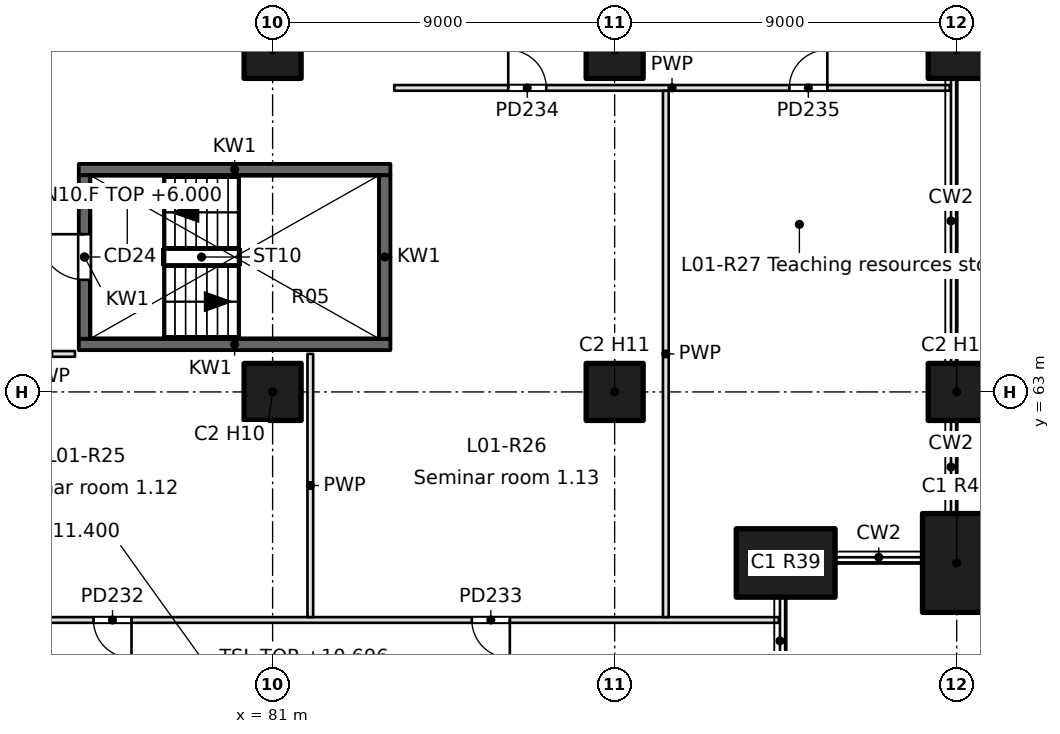
"""IFC4 building model, lengths in metres.
Left out: names, types, materials, properties, quantities, classifications, styles, units other than length and angle.
Written with IfcOpenShell. Run it as: python <this file> out.ifc"""

import sys

from ifc_helpers import new_model, si_unit, direction, frame, frame_2d, origin, origin_2d, place, context, subcontext, project, spatial, rectangle, extrude, element, fill, save


model = new_model("IFC4")
c1 = context("Model", 3, precision=1e-05, world=origin(), true_north=direction((0.0, 1.0)))
c2 = subcontext(c1, "Body", "Model", "MODEL_VIEW")
j1 = project(units=[si_unit("LENGTHUNIT", "METRE"), si_unit("PLANEANGLEUNIT", "RADIAN")], contexts=[c1])
p1 = place(None, origin())
s1 = spatial("IfcSite", under=j1, at=p1, CompositionType="ELEMENT")
p2 = place(p1, origin())
s2 = spatial("IfcBuilding", under=s1, at=p2, CompositionType="ELEMENT")
p3 = place(p2, frame((0.0, 0.0, 6.0)))
s3 = spatial("IfcBuildingStorey", under=s2, at=p3, CompositionType="ELEMENT", Elevation=6.0)
for number, where, z_axis, x_axis in (
    (1, (94.5, 58.5, 0.0), (0.0, 0.0, 1.0), (1.0, 0.0, 0.0)),
    (2, (99.0, 58.5, 0.0), (0.0, 0.0, 1.0), (0.0, 1.0, 0.0)),
):
    element("IfcColumn", number, at=place(p3, frame(where, z_axis=z_axis, x_axis=x_axis)), inside=s3, PredefinedType="COLUMN", context=c2, shape_type="SweptSolid", body=[
        extrude(rectangle(XDim=2.6, YDim=1.8, at=origin_2d()), origin(), (0.0, 0.0, 1.0), 5.4),
    ])
for number, where, z_axis, x_axis in (
    (3, (99.0, 63.0, 0.0), (0.0, 0.0, 1.0), (1.0, 0.0, 0.0)),
    (4, (99.0, 72.0, 0.0), (0.0, 0.0, 1.0), (1.0, 0.0, 0.0)),
    (5, (81.0, 63.0, 0.0), (0.0, 0.0, 1.0), (1.0, 0.0, 0.0)),
    (6, (81.0, 72.0, 0.0), (0.0, 0.0, 1.0), (1.0, 0.0, 0.0)),
    (7, (90.0, 63.0, 0.0), (0.0, 0.0, 1.0), (1.0, 0.0, 0.0)),
    (8, (90.0, 72.0, 0.0), (0.0, 0.0, 1.0), (1.0, 0.0, 0.0)),
):
    element("IfcColumn", number, at=place(p3, frame(where, z_axis=z_axis, x_axis=x_axis)), inside=s3, PredefinedType="COLUMN", context=c2, shape_type="SweptSolid", body=[
        extrude(rectangle(XDim=1.5, YDim=1.5, at=origin_2d()), origin(), (0.0, 0.0, 1.0), 5.4),
    ])
for number, where, z_axis, x_axis in (
    (9, (75.9, 64.25, -0.35), (0.0, 0.0, 1.0), (1.0, 0.0, 0.0)),
    (10, (75.9, 68.85, -0.35), (0.0, 0.0, 1.0), (1.0, 0.0, 0.0)),
):
    element("IfcWall", number, at=place(p3, frame(where, z_axis=z_axis, x_axis=x_axis)), inside=s3, PredefinedType="SOLIDWALL", context=c2, shape_type="SweptSolid", body=[
        extrude(rectangle(XDim=8.2, YDim=0.3, at=frame_2d((4.1, 0.0))), origin(), (0.0, 0.0, 1.0), 5.4),
    ])
p4 = place(p3, frame((76.05, 64.4, -0.35), z_axis=(0.0, 0.0, 1.0), x_axis=(0.0, 1.0, 0.0)))
e11 = element("IfcWall", 11, at=p4, inside=s3, PredefinedType="SOLIDWALL", context=c2, shape_type="SweptSolid", body=[
    extrude(rectangle(XDim=4.3, YDim=0.3, at=frame_2d((2.15, 0.0))), origin(), (0.0, 0.0, 1.0), 5.4),
])
p5 = place(p4, frame((1.55, 0.0, 0.35)))
e12 = element("IfcOpeningElement", 12, at=p5, cuts=e11, PredefinedType="OPENING", context=c2, shape_type="SweptSolid", body=[
    extrude(rectangle(XDim=1.2, YDim=2.1, at=frame_2d((0.6, 1.05))), frame((0.0, 0.15, 0.0), z_axis=(0.0, -1.0, 0.0), x_axis=(1.0, 0.0, 0.0)), (0.0, 0.0, 1.0), 0.3),
])
p6 = place(p3, frame((83.95, 64.4, -0.35), z_axis=(0.0, 0.0, 1.0), x_axis=(0.0, 1.0, 0.0)))
e13 = element("IfcWall", 13, at=p6, inside=s3, PredefinedType="SOLIDWALL", context=c2, shape_type="SweptSolid", body=[
    extrude(rectangle(XDim=4.3, YDim=0.3, at=frame_2d((2.15, 0.0))), origin(), (0.0, 0.0, 1.0), 5.4),
])
p7 = place(p3, frame((74.425, 64.0, 0.0), z_axis=(0.0, 0.0, 1.0), x_axis=(1.0, 0.0, 0.0)))
e14 = element("IfcWall", 14, at=p7, inside=s3, PredefinedType="PARTITIONING", context=c2, shape_type="SweptSolid", body=[
    extrude(rectangle(XDim=1.375, YDim=0.15, at=frame_2d((0.688, 0.0))), origin(), (0.0, 0.0, 1.0), 5.05),
])
p8 = place(p3, frame((94.32, 57.0, 0.0), z_axis=(0.0, 0.0, 1.0), x_axis=(-1.0, 0.0, 0.0)))
e15 = element("IfcWall", 15, at=p8, inside=s3, PredefinedType="PARTITIONING", context=c2, shape_type="SweptSolid", body=[
    extrude(rectangle(XDim=49.395, YDim=0.15, at=frame_2d((24.698, 0.0))), origin(), (0.0, 0.0, 1.0), 5.05),
])
p9 = place(p8, frame((44.57, 0.0, 0.0)))
e16 = element("IfcOpeningElement", 16, at=p9, cuts=e15, PredefinedType="OPENING", context=c2, shape_type="SweptSolid", body=[
    extrude(rectangle(XDim=1.0, YDim=2.1, at=frame_2d((0.5, 1.05))), frame((0.0, 0.075, 0.0), z_axis=(0.0, -1.0, 0.0), x_axis=(1.0, 0.0, 0.0)), (0.0, 0.0, 1.0), 0.15),
])
p10 = place(p8, frame((34.566, 0.0, 0.0)))
e17 = element("IfcOpeningElement", 17, at=p10, cuts=e15, PredefinedType="OPENING", context=c2, shape_type="SweptSolid", body=[
    extrude(rectangle(XDim=1.0, YDim=2.1, at=frame_2d((0.5, 1.05))), frame((0.0, 0.075, 0.0), z_axis=(0.0, -1.0, 0.0), x_axis=(1.0, 0.0, 0.0)), (0.0, 0.0, 1.0), 0.15),
])
p11 = place(p8, frame((25.336, 0.0, 0.0)))
e18 = element("IfcOpeningElement", 18, at=p11, cuts=e15, PredefinedType="OPENING", context=c2, shape_type="SweptSolid", body=[
    extrude(rectangle(XDim=1.0, YDim=2.1, at=frame_2d((0.5, 1.05))), frame((0.0, 0.075, 0.0), z_axis=(0.0, -1.0, 0.0), x_axis=(1.0, 0.0, 0.0)), (0.0, 0.0, 1.0), 0.15),
])
p12 = place(p8, frame((17.033, 0.0, 0.0)))
e19 = element("IfcOpeningElement", 19, at=p12, cuts=e15, PredefinedType="OPENING", context=c2, shape_type="SweptSolid", body=[
    extrude(rectangle(XDim=1.0, YDim=2.1, at=frame_2d((0.5, 1.05))), frame((0.0, 0.075, 0.0), z_axis=(0.0, -1.0, 0.0), x_axis=(1.0, 0.0, 0.0)), (0.0, 0.0, 1.0), 0.15),
])
p13 = place(p8, frame((7.078, 0.0, 0.0)))
e20 = element("IfcOpeningElement", 20, at=p13, cuts=e15, PredefinedType="OPENING", context=c2, shape_type="SweptSolid", body=[
    extrude(rectangle(XDim=1.0, YDim=2.1, at=frame_2d((0.5, 1.05))), frame((0.0, 0.075, 0.0), z_axis=(0.0, -1.0, 0.0), x_axis=(1.0, 0.0, 0.0)), (0.0, 0.0, 1.0), 0.15),
])
p14 = place(p3, frame((84.2, 71.0, 0.0), z_axis=(0.0, 0.0, 1.0), x_axis=(1.0, 0.0, 0.0)))
e21 = element("IfcWall", 21, at=p14, inside=s3, PredefinedType="PARTITIONING", context=c2, shape_type="SweptSolid", body=[
    extrude(rectangle(XDim=14.62, YDim=0.15, at=frame_2d((7.31, 0.0))), origin(), (0.0, 0.0, 1.0), 5.05),
])
p15 = place(p14, frame((3.0, 0.0, 0.0)))
e22 = element("IfcOpeningElement", 22, at=p15, cuts=e21, PredefinedType="OPENING", context=c2, shape_type="SweptSolid", body=[
    extrude(rectangle(XDim=1.0, YDim=2.1, at=frame_2d((0.5, 1.05))), frame((0.0, 0.075, 0.0), z_axis=(0.0, -1.0, 0.0), x_axis=(1.0, 0.0, 0.0)), (0.0, 0.0, 1.0), 0.15),
])
p16 = place(p14, frame((10.396, 0.0, 0.0)))
e23 = element("IfcOpeningElement", 23, at=p16, cuts=e21, PredefinedType="OPENING", context=c2, shape_type="SweptSolid", body=[
    extrude(rectangle(XDim=1.0, YDim=2.1, at=frame_2d((0.5, 1.05))), frame((0.0, 0.075, 0.0), z_axis=(0.0, -1.0, 0.0), x_axis=(1.0, 0.0, 0.0)), (0.0, 0.0, 1.0), 0.15),
])
p17 = place(p3, frame((81.992, 57.075, 0.0), z_axis=(0.0, 0.0, 1.0), x_axis=(0.0, 1.0, 0.0)))
e24 = element("IfcWall", 24, at=p17, inside=s3, PredefinedType="PARTITIONING", context=c2, shape_type="SweptSolid", body=[
    extrude(rectangle(XDim=6.925, YDim=0.15, at=frame_2d((3.462, 0.0))), origin(), (0.0, 0.0, 1.0), 5.05),
])
p18 = place(p3, frame((91.346, 57.075, 0.0), z_axis=(0.0, 0.0, 1.0), x_axis=(0.0, 1.0, 0.0)))
e25 = element("IfcWall", 25, at=p18, inside=s3, PredefinedType="PARTITIONING", context=c2, shape_type="SweptSolid", body=[
    extrude(rectangle(XDim=13.85, YDim=0.15, at=frame_2d((6.925, 0.0))), origin(), (0.0, 0.0, 1.0), 5.05),
])
p19 = place(p5, origin())
e26 = element("IfcDoor", 26, at=p19, inside=s3, OperationType="SINGLE_SWING_RIGHT", PredefinedType="DOOR", context=c2, shape_type="SweptSolid", body=[
    extrude(rectangle(XDim=1.2, YDim=2.1, at=frame_2d((0.6, 1.05))), frame((0.0, 0.025, 0.0), z_axis=(0.0, -1.0, 0.0), x_axis=(1.0, 0.0, 0.0)), (0.0, 0.0, 1.0), 0.05),
])
fill(e12, e26)
p20 = place(p12, origin())
e27 = element("IfcDoor", 27, at=p20, inside=s3, OperationType="SINGLE_SWING_LEFT", PredefinedType="DOOR", context=c2, shape_type="SweptSolid", body=[
    extrude(rectangle(XDim=1.0, YDim=2.1, at=frame_2d((0.5, 1.05))), frame((0.0, 0.025, 0.0), z_axis=(0.0, -1.0, 0.0), x_axis=(1.0, 0.0, 0.0)), (0.0, 0.0, 1.0), 0.05),
])
fill(e19, e27)
p21 = place(p13, origin())
e28 = element("IfcDoor", 28, at=p21, inside=s3, OperationType="SINGLE_SWING_LEFT", PredefinedType="DOOR", context=c2, shape_type="SweptSolid", body=[
    extrude(rectangle(XDim=1.0, YDim=2.1, at=frame_2d((0.5, 1.05))), frame((0.0, 0.025, 0.0), z_axis=(0.0, -1.0, 0.0), x_axis=(1.0, 0.0, 0.0)), (0.0, 0.0, 1.0), 0.05),
])
fill(e20, e28)
p22 = place(p15, origin())
e29 = element("IfcDoor", 29, at=p22, inside=s3, OperationType="SINGLE_SWING_LEFT", PredefinedType="DOOR", context=c2, shape_type="SweptSolid", body=[
    extrude(rectangle(XDim=1.0, YDim=2.1, at=frame_2d((0.5, 1.05))), frame((0.0, 0.025, 0.0), z_axis=(0.0, -1.0, 0.0), x_axis=(1.0, 0.0, 0.0)), (0.0, 0.0, 1.0), 0.05),
])
fill(e22, e29)
p23 = place(p16, origin())
e30 = element("IfcDoor", 30, at=p23, inside=s3, OperationType="SINGLE_SWING_RIGHT", PredefinedType="DOOR", context=c2, shape_type="SweptSolid", body=[
    extrude(rectangle(XDim=1.0, YDim=2.1, at=frame_2d((0.5, 1.05))), frame((0.0, 0.025, 0.0), z_axis=(0.0, -1.0, 0.0), x_axis=(1.0, 0.0, 0.0)), (0.0, 0.0, 1.0), 0.05),
])
fill(e23, e30)
save(model, sys.argv[1])
